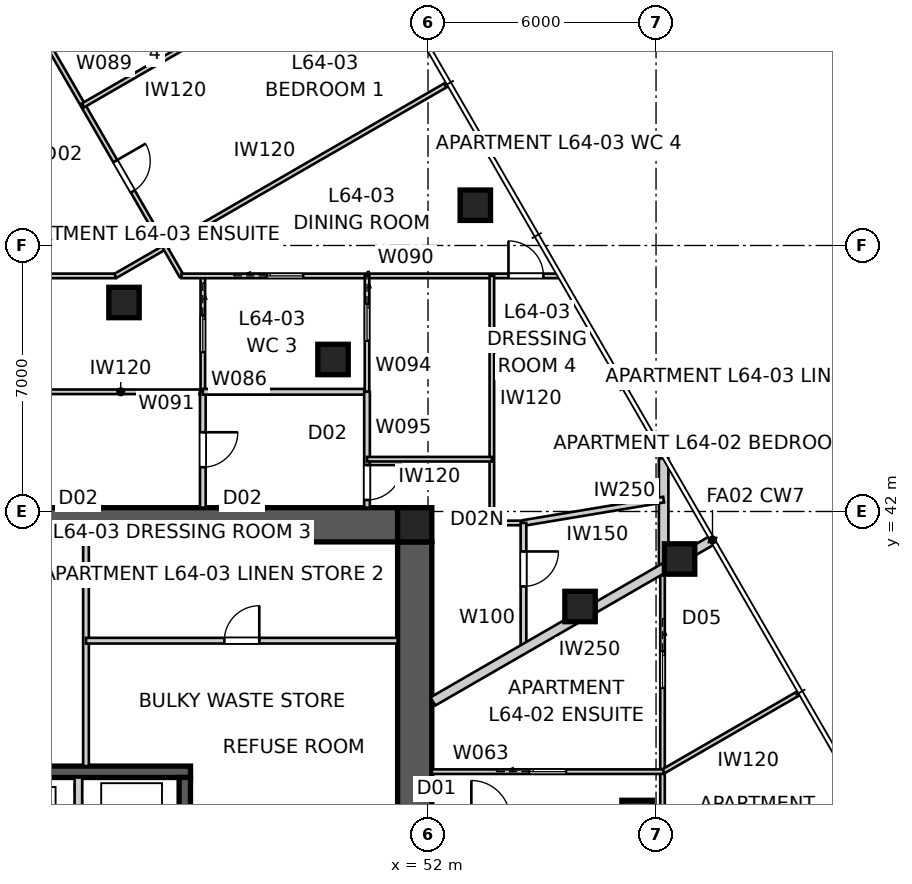
"""IFC4 building model, lengths in metres.
Left out: names, types, materials, properties, quantities, classifications, styles, units other than length and angle.
Written with IfcOpenShell. Run it as: python <this file> out.ifc"""

import sys

from ifc_helpers import new_model, si_unit, direction, frame, frame_2d, origin, origin_2d, place, context, subcontext, project, spatial, polyline, rectangle, outline, extrude, element, fill, save


model = new_model("IFC4")
c1 = context("Model", 3, precision=1e-05, world=origin(), true_north=direction((0.0, 1.0)))
c2 = subcontext(c1, "Body", "Model", "MODEL_VIEW")
j1 = project(units=[si_unit("LENGTHUNIT", "METRE"), si_unit("PLANEANGLEUNIT", "RADIAN")], contexts=[c1])
p1 = place(None, origin())
s1 = spatial("IfcSite", under=j1, at=p1, CompositionType="ELEMENT")
p2 = place(p1, origin())
s2 = spatial("IfcBuilding", under=s1, at=p2, CompositionType="ELEMENT")
p3 = place(p2, frame((0.0, 0.0, 232.0)))
s3 = spatial("IfcBuildingStorey", under=s2, at=p3, CompositionType="ELEMENT", Elevation=232.0)
p4 = place(p3, frame((28.8, 41.65, 0.0), z_axis=(0.0, 0.0, 1.0), x_axis=(1.0, 0.0, 0.0)))
e1 = element("IfcWall", 1, at=p4, inside=s3, PredefinedType="SHEAR", context=c2, shape_type="SweptSolid", body=[
    extrude(outline(polyline([(0.0, -0.45), (22.4, -0.45), (22.4, -0.025), (22.85, -0.025), (22.85, 0.025), (22.4, 0.025), (22.4, 0.45), (0.0, 0.45), (0.0, 0.025), (-0.45, 0.025), (-0.45, -0.025), (0.0, -0.025), (0.0, -0.45)])), origin(), (0.0, 0.0, 1.0), 3.4),
])
p5 = place(p3, frame((51.65, 18.8, 0.0), z_axis=(0.0, 0.0, 1.0), x_axis=(0.0, 1.0, 0.0)))
e2 = element("IfcWall", 2, at=p5, inside=s3, PredefinedType="SHEAR", context=c2, shape_type="SweptSolid", body=[
    extrude(outline(polyline([(0.0, -0.45), (22.4, -0.45), (22.4, -0.025), (22.85, -0.025), (22.85, 0.025), (22.4, 0.025), (22.4, 0.45), (0.0, 0.45), (0.0, 0.025), (-0.45, 0.025), (-0.45, -0.025), (0.0, -0.025), (0.0, -0.45)])), origin(), (0.0, 0.0, 1.0), 3.4),
])
p6 = place(p5, frame((11.14, 0.0, 0.0)))
e3 = element("IfcOpeningElement", 3, at=p6, cuts=e2, PredefinedType="OPENING", context=c2, shape_type="SweptSolid", body=[
    extrude(rectangle(XDim=1.02, YDim=2.4, at=frame_2d((0.51, 1.2))), frame((0.0, 0.46, 0.0), z_axis=(0.0, -1.0, 0.0), x_axis=(1.0, 0.0, 0.0)), (0.0, 0.0, 1.0), 0.92),
])
p7 = place(p3, frame((34.25, 35.15, 0.0), z_axis=(0.0, 0.0, 1.0), x_axis=(1.0, 0.0, 0.0)))
e4 = element("IfcWall", 4, at=p7, inside=s3, PredefinedType="SHEAR", context=c2, shape_type="SweptSolid", body=[
    extrude(rectangle(XDim=11.5, YDim=0.3, at=frame_2d((5.75, 0.0))), origin(), (0.0, 0.0, 1.0), 3.4),
])
p8 = place(p3, frame((42.8, 32.2, 0.0), z_axis=(0.0, 0.0, 1.0), x_axis=(0.0, 1.0, 0.0)))
e5 = element("IfcWall", 5, at=p8, inside=s3, PredefinedType="SOLIDWALL", context=c2, shape_type="SweptSolid", body=[
    extrude(rectangle(XDim=2.8, YDim=0.2, at=frame_2d((1.4, 0.0))), origin(), (0.0, 0.0, 1.0), 3.4),
])
p9 = place(p3, frame((45.6, 32.2, 0.0), z_axis=(0.0, 0.0, 1.0), x_axis=(0.0, 1.0, 0.0)))
e6 = element("IfcWall", 6, at=p9, inside=s3, PredefinedType="SHEAR", context=c2, shape_type="SweptSolid", body=[
    extrude(rectangle(XDim=2.8, YDim=0.3, at=frame_2d((1.4, 0.0))), origin(), (0.0, 0.0, 1.0), 3.4),
])
p10 = place(p3, frame((51.65, 41.65, 0.0), z_axis=(0.0, 0.0, 1.0), x_axis=(1.0, 0.0, 0.0)))
e7 = element("IfcColumn", 7, at=p10, inside=s3, PredefinedType="COLUMN", context=c2, shape_type="SweptSolid", body=[
    extrude(rectangle(XDim=0.9, YDim=0.9, at=origin_2d()), origin(), (0.0, 0.0, 1.0), 3.4),
])
for number, where, z_axis, x_axis in (
    (8, (58.62, 40.75, 0.0), (0.0, 0.0, 1.0), (1.0, 0.0, 0.0)),
    (9, (53.245, 50.06, 0.0), (0.0, 0.0, 1.0), (1.0, 0.0, 0.0)),
):
    element("IfcColumn", number, at=place(p3, frame(where, z_axis=z_axis, x_axis=x_axis)), inside=s3, PredefinedType="COLUMN", context=c2, shape_type="SweptSolid", body=[
        extrude(rectangle(XDim=0.8, YDim=0.8, at=origin_2d()), origin(), (0.0, 0.0, 1.0), 3.2),
    ])
for number, where, z_axis, x_axis in (
    (10, (57.5, 34.0, 0.0), (0.0, 0.0, 1.0), (1.0, 0.0, 0.0)),
    (11, (56.0, 39.5, 0.0), (0.0, 0.0, 1.0), (1.0, 0.0, 0.0)),
    (12, (49.5, 46.0, 0.0), (0.0, 0.0, 1.0), (1.0, 0.0, 0.0)),
    (13, (44.0, 47.5, 0.0), (0.0, 0.0, 1.0), (1.0, 0.0, 0.0)),
):
    element("IfcColumn", number, at=place(p3, frame(where, z_axis=z_axis, x_axis=x_axis)), inside=s3, PredefinedType="COLUMN", context=c2, shape_type="SweptSolid", body=[
        extrude(rectangle(XDim=0.8, YDim=0.8, at=origin_2d()), origin(), (0.0, 0.0, 1.0), 3.4),
    ])
p11 = place(p3, frame((59.486, 41.25, 0.0), z_axis=(0.0, 0.0, 1.0), x_axis=(-0.866020489494, -0.500008511703, 0.0)))
e14 = element("IfcWall", 14, at=p11, inside=s3, PredefinedType="PARTITIONING", context=c2, shape_type="SweptSolid", body=[
    extrude(rectangle(XDim=8.496, YDim=0.25, at=frame_2d((4.248, 0.0))), origin(), (0.0, 0.0, 1.0), 3.2),
])
p12 = place(p3, frame((43.0, 41.2, 0.0), z_axis=(0.0, 0.0, 1.0), x_axis=(0.0, -1.0, 0.0)))
e15 = element("IfcWall", 15, at=p12, inside=s3, PredefinedType="SOLIDWALL", context=c2, shape_type="SweptSolid", body=[
    extrude(rectangle(XDim=5.9, YDim=0.15, at=frame_2d((2.95, 0.0))), origin(), (0.0, 0.0, 1.0), 3.2),
])
p13 = place(p3, frame((43.0, 38.6, 0.0), z_axis=(0.0, 0.0, 1.0), x_axis=(1.0, 0.0, 0.0)))
e16 = element("IfcWall", 16, at=p13, inside=s3, PredefinedType="SOLIDWALL", context=c2, shape_type="SweptSolid", body=[
    extrude(rectangle(XDim=8.2, YDim=0.15, at=frame_2d((4.1, 0.0))), origin(), (0.0, 0.0, 1.0), 3.2),
])
p14 = place(p13, frame((3.64, 0.0, 0.0)))
e17 = element("IfcOpeningElement", 17, at=p14, cuts=e16, PredefinedType="OPENING", context=c2, shape_type="SweptSolid", body=[
    extrude(rectangle(XDim=0.92, YDim=2.1, at=frame_2d((0.46, 1.05))), frame((0.0, 0.085, 0.0), z_axis=(0.0, -1.0, 0.0), x_axis=(1.0, 0.0, 0.0)), (0.0, 0.0, 1.0), 0.17),
])
p15 = place(p3, frame((58.171, 40.491, 0.0), z_axis=(0.0, 0.0, 1.0), x_axis=(-5.1455328e-05, -0.999999998676, 0.0)))
e18 = element("IfcWall", 18, at=p15, inside=s3, PredefinedType="PARTITIONING", context=c2, shape_type="SweptSolid", body=[
    extrude(rectangle(XDim=14.234, YDim=0.12, at=frame_2d((7.117, 0.0))), origin(), (0.0, 0.0, 1.0), 3.2),
])
p16 = place(p15, frame((6.932, 0.0, 0.0)))
e19 = element("IfcOpeningElement", 19, at=p16, cuts=e18, PredefinedType="OPENING", context=c2, shape_type="SweptSolid", body=[
    extrude(rectangle(XDim=0.92, YDim=2.34, at=frame_2d((0.46, 1.17))), frame((0.0, 0.07, 0.0), z_axis=(0.0, -1.0, 0.0), x_axis=(1.0, 0.0, 0.0)), (0.0, 0.0, 1.0), 0.14),
])
p17 = place(p15, frame((11.829, 0.0, 0.0)))
e20 = element("IfcOpeningElement", 20, at=p17, cuts=e18, PredefinedType="OPENING", context=c2, shape_type="SweptSolid", body=[
    extrude(rectangle(XDim=0.96, YDim=2.1, at=frame_2d((0.48, 1.05))), frame((0.0, 0.07, 0.0), z_axis=(0.0, -1.0, 0.0), x_axis=(1.0, 0.0, 0.0)), (0.0, 0.0, 1.0), 0.14),
])
p18 = place(p15, frame((2.174, 0.0, 0.0)))
e21 = element("IfcOpeningElement", 21, at=p18, cuts=e18, PredefinedType="OPENING", context=c2, shape_type="SweptSolid", body=[
    extrude(rectangle(XDim=0.96, YDim=2.1, at=frame_2d((0.48, 1.05))), frame((0.0, 0.07, 0.0), z_axis=(0.0, -1.0, 0.0), x_axis=(1.0, 0.0, 0.0)), (0.0, 0.0, 1.0), 0.14),
])
p19 = place(p3, frame((52.1, 35.153, 0.0), z_axis=(0.0, 0.0, 1.0), x_axis=(1.0, 0.0, 0.0)))
e22 = element("IfcWall", 22, at=p19, inside=s3, PredefinedType="PARTITIONING", context=c2, shape_type="SweptSolid", body=[
    extrude(rectangle(XDim=6.1, YDim=0.12, at=frame_2d((3.05, 0.0))), origin(), (0.0, 0.0, 1.0), 3.2),
])
p20 = place(p19, frame((2.57, 0.0, 0.0)))
e23 = element("IfcOpeningElement", 23, at=p20, cuts=e22, PredefinedType="OPENING", context=c2, shape_type="SweptSolid", body=[
    extrude(rectangle(XDim=0.96, YDim=2.1, at=frame_2d((0.48, 1.05))), frame((0.0, 0.07, 0.0), z_axis=(0.0, -1.0, 0.0), x_axis=(1.0, 0.0, 0.0)), (0.0, 0.0, 1.0), 0.14),
])
p21 = place(p3, frame((58.2, 35.167, 0.0), z_axis=(0.0, 0.0, 1.0), x_axis=(0.866025520146, 0.499999798456, 0.0)))
e24 = element("IfcWall", 24, at=p21, inside=s3, PredefinedType="PARTITIONING", context=c2, shape_type="SweptSolid", body=[
    extrude(rectangle(XDim=4.115, YDim=0.12, at=frame_2d((2.057, 0.0))), origin(), (0.0, 0.0, 1.0), 3.2),
])
p22 = place(p3, frame((58.2, 40.525, 0.0), z_axis=(0.0, 0.0, 1.0), x_axis=(0.0, 1.0, 0.0)))
e25 = element("IfcWall", 25, at=p22, inside=s3, PredefinedType="PARTITIONING", context=c2, shape_type="SweptSolid", body=[
    extrude(rectangle(XDim=2.872, YDim=0.25, at=frame_2d((1.436, 0.0))), origin(), (0.0, 0.0, 1.0), 3.2),
])
p23 = place(p3, frame((26.603, 48.2, 0.0), z_axis=(0.0, 0.0, 1.0), x_axis=(1.0, 0.0, 0.0)))
e26 = element("IfcWall", 26, at=p23, inside=s3, PredefinedType="PARTITIONING", context=c2, shape_type="SweptSolid", body=[
    extrude(rectangle(XDim=17.17, YDim=0.12, at=frame_2d((8.585, 0.0))), origin(), (0.0, 0.0, 1.0), 3.2),
])
p24 = place(p23, frame((1.25, 0.0, 0.0)))
e27 = element("IfcOpeningElement", 27, at=p24, cuts=e26, PredefinedType="OPENING", context=c2, shape_type="SweptSolid", body=[
    extrude(rectangle(XDim=0.92, YDim=2.1, at=frame_2d((0.46, 1.05))), frame((0.0, 0.07, 0.0), z_axis=(0.0, -1.0, 0.0), x_axis=(1.0, 0.0, 0.0)), (0.0, 0.0, 1.0), 0.14),
])
p25 = place(p3, frame((46.074, 45.15, 0.0), z_axis=(0.0, 0.0, 1.0), x_axis=(-1.0, 0.0, 0.0)))
e28 = element("IfcWall", 28, at=p25, inside=s3, PredefinedType="PARTITIONING", context=c2, shape_type="SweptSolid", body=[
    extrude(rectangle(XDim=4.321, YDim=0.12, at=frame_2d((2.16, 0.0))), origin(), (0.0, 0.0, 1.0), 3.2),
])
p26 = place(p3, frame((46.074, 48.2, 0.0), z_axis=(0.0, 0.0, 1.0), x_axis=(0.0, -1.0, 0.0)))
e29 = element("IfcWall", 29, at=p26, inside=s3, PredefinedType="PARTITIONING", context=c2, shape_type="SweptSolid", body=[
    extrude(rectangle(XDim=3.05, YDim=0.12, at=frame_2d((1.525, 0.0))), origin(), (0.0, 0.0, 1.0), 3.2),
])
p27 = place(p26, frame((1.045, 0.0, 0.0)))
e30 = element("IfcOpeningElement", 30, at=p27, cuts=e29, PredefinedType="OPENING", context=c2, shape_type="SweptSolid", body=[
    extrude(rectangle(XDim=0.96, YDim=2.1, at=frame_2d((0.48, 1.05))), frame((0.0, 0.07, 0.0), z_axis=(0.0, -1.0, 0.0), x_axis=(1.0, 0.0, 0.0)), (0.0, 0.0, 1.0), 0.14),
])
p28 = place(p3, frame((43.773, 48.2, 0.0), z_axis=(0.0, 0.0, 1.0), x_axis=(0.866020818659, 0.500007941587, 0.0)))
e31 = element("IfcWall", 31, at=p28, inside=s3, PredefinedType="PARTITIONING", context=c2, shape_type="SweptSolid", body=[
    extrude(rectangle(XDim=10.092, YDim=0.12, at=frame_2d((5.046, 0.0))), origin(), (0.0, 0.0, 1.0), 3.2),
])
p29 = place(p3, frame((40.786, 56.388, 0.0), z_axis=(0.0, 0.0, 1.0), x_axis=(0.49999364752, -0.86602907136, 0.0)))
e32 = element("IfcWall", 32, at=p29, inside=s3, PredefinedType="PARTITIONING", context=c2, shape_type="SweptSolid", body=[
    extrude(rectangle(XDim=9.455, YDim=0.12, at=frame_2d((4.728, 0.0))), origin(), (0.0, 0.0, 1.0), 3.2),
])
p30 = place(p29, frame((1.681, 0.0, 0.0)))
e33 = element("IfcOpeningElement", 33, at=p30, cuts=e32, PredefinedType="OPENING", context=c2, shape_type="SweptSolid", body=[
    extrude(rectangle(XDim=0.92, YDim=2.34, at=frame_2d((0.46, 1.17))), frame((0.0, 0.07, 0.0), z_axis=(0.0, -1.0, 0.0), x_axis=(1.0, 0.0, 0.0)), (0.0, 0.0, 1.0), 0.14),
])
p31 = place(p29, frame((5.969, 0.0, 0.0)))
e34 = element("IfcOpeningElement", 34, at=p31, cuts=e32, PredefinedType="OPENING", context=c2, shape_type="SweptSolid", body=[
    extrude(rectangle(XDim=0.92, YDim=2.34, at=frame_2d((0.46, 1.17))), frame((0.0, 0.07, 0.0), z_axis=(0.0, -1.0, 0.0), x_axis=(1.0, 0.0, 0.0)), (0.0, 0.0, 1.0), 0.14),
])
p32 = place(p3, frame((45.514, 48.2, 0.0), z_axis=(0.0, 0.0, 1.0), x_axis=(1.0, 0.0, 0.0)))
e35 = element("IfcWall", 35, at=p32, inside=s3, PredefinedType="PARTITIONING", context=c2, shape_type="SweptSolid", body=[
    extrude(rectangle(XDim=9.913, YDim=0.12, at=frame_2d((4.957, 0.0))), origin(), (0.0, 0.0, 1.0), 3.2),
])
p33 = place(p32, frame((2.241, 0.0, 0.0)))
e36 = element("IfcOpeningElement", 36, at=p33, cuts=e35, PredefinedType="OPENING", context=c2, shape_type="SweptSolid", body=[
    extrude(rectangle(XDim=0.96, YDim=2.1, at=frame_2d((0.48, 1.05))), frame((0.0, 0.07, 0.0), z_axis=(0.0, -1.0, 0.0), x_axis=(1.0, 0.0, 0.0)), (0.0, 0.0, 1.0), 0.14),
])
p34 = place(p32, frame((8.603, 0.0, 0.0)))
e37 = element("IfcOpeningElement", 37, at=p34, cuts=e35, PredefinedType="OPENING", context=c2, shape_type="SweptSolid", body=[
    extrude(rectangle(XDim=0.92, YDim=2.1, at=frame_2d((0.46, 1.05))), frame((0.0, 0.07, 0.0), z_axis=(0.0, -1.0, 0.0), x_axis=(1.0, 0.0, 0.0)), (0.0, 0.0, 1.0), 0.14),
])
p35 = place(p3, frame((46.074, 45.15, 0.0), z_axis=(0.0, 0.0, 1.0), x_axis=(0.0, -1.0, 0.0)))
e38 = element("IfcWall", 38, at=p35, inside=s3, PredefinedType="SOLIDWALL", context=c2, shape_type="SweptSolid", body=[
    extrude(rectangle(XDim=3.05, YDim=0.15, at=frame_2d((1.525, 0.0))), origin(), (0.0, 0.0, 1.0), 3.2),
])
p36 = place(p35, frame((1.065, 0.0, 0.0)))
e39 = element("IfcOpeningElement", 39, at=p36, cuts=e38, PredefinedType="OPENING", context=c2, shape_type="SweptSolid", body=[
    extrude(rectangle(XDim=0.92, YDim=2.34, at=frame_2d((0.46, 1.17))), frame((0.0, 0.085, 0.0), z_axis=(0.0, -1.0, 0.0), x_axis=(1.0, 0.0, 0.0)), (0.0, 0.0, 1.0), 0.17),
])
p37 = place(p3, frame((50.395, 45.15, 0.0), z_axis=(0.0, 0.0, 1.0), x_axis=(-1.0, 0.0, 0.0)))
e40 = element("IfcWall", 40, at=p37, inside=s3, PredefinedType="SOLIDWALL", context=c2, shape_type="SweptSolid", body=[
    extrude(rectangle(XDim=4.321, YDim=0.15, at=frame_2d((2.16, 0.0))), origin(), (0.0, 0.0, 1.0), 3.2),
])
p38 = place(p3, frame((50.395, 48.2, 0.0), z_axis=(0.0, 0.0, 1.0), x_axis=(0.0, -1.0, 0.0)))
e41 = element("IfcWall", 41, at=p38, inside=s3, PredefinedType="PARTITIONING", context=c2, shape_type="SweptSolid", body=[
    extrude(rectangle(XDim=3.05, YDim=0.12, at=frame_2d((1.525, 0.0))), origin(), (0.0, 0.0, 1.0), 3.2),
])
p39 = place(p38, frame((0.745, 0.0, 0.0)))
e42 = element("IfcOpeningElement", 42, at=p39, cuts=e41, PredefinedType="OPENING", context=c2, shape_type="SweptSolid", body=[
    extrude(rectangle(XDim=0.96, YDim=2.1, at=frame_2d((0.48, 1.05))), frame((0.0, 0.07, 0.0), z_axis=(0.0, -1.0, 0.0), x_axis=(1.0, 0.0, 0.0)), (0.0, 0.0, 1.0), 0.14),
])
p40 = place(p3, frame((50.395, 45.15, 0.0), z_axis=(0.0, 0.0, 1.0), x_axis=(0.0, -1.0, 0.0)))
e43 = element("IfcWall", 43, at=p40, inside=s3, PredefinedType="SOLIDWALL", context=c2, shape_type="SweptSolid", body=[
    extrude(rectangle(XDim=3.05, YDim=0.15, at=frame_2d((1.525, 0.0))), origin(), (0.0, 0.0, 1.0), 3.2),
])
p41 = place(p40, frame((1.927, 0.0, 0.0)))
e44 = element("IfcOpeningElement", 44, at=p41, cuts=e43, PredefinedType="OPENING", context=c2, shape_type="SweptSolid", body=[
    extrude(rectangle(XDim=0.92, YDim=2.34, at=frame_2d((0.46, 1.17))), frame((0.0, 0.085, 0.0), z_axis=(0.0, -1.0, 0.0), x_axis=(1.0, 0.0, 0.0)), (0.0, 0.0, 1.0), 0.17),
])
p42 = place(p3, frame((53.68, 41.698, 0.0), z_axis=(0.0, 0.0, 1.0), x_axis=(0.0, 1.0, 0.0)))
e45 = element("IfcWall", 45, at=p42, inside=s3, PredefinedType="PARTITIONING", context=c2, shape_type="SweptSolid", body=[
    extrude(rectangle(XDim=6.501, YDim=0.12, at=frame_2d((3.251, 0.0))), origin(), (0.0, 0.0, 1.0), 3.2),
])
p43 = place(p3, frame((54.512, 41.698, 0.0), z_axis=(0.0, 0.0, 1.0), x_axis=(-1.0, 0.0, 0.0)))
e46 = element("IfcWall", 46, at=p43, inside=s3, PredefinedType="PARTITIONING", context=c2, shape_type="SweptSolid", body=[
    extrude(rectangle(XDim=0.832, YDim=0.12, at=frame_2d((0.416, 0.0))), origin(), (0.0, 0.0, 1.0), 3.2),
])
p44 = place(p3, frame((58.2, 42.312, 0.0), z_axis=(0.0, 0.0, 1.0), x_axis=(-0.986423908189, -0.164218979883, 0.0)))
e47 = element("IfcWall", 47, at=p44, inside=s3, PredefinedType="SOLIDWALL", context=c2, shape_type="SweptSolid", body=[
    extrude(rectangle(XDim=3.739, YDim=0.15, at=frame_2d((1.87, 0.0))), origin(), (0.0, 0.0, 1.0), 3.2),
])
p45 = place(p3, frame((53.68, 43.376, 0.0), z_axis=(0.0, 0.0, 1.0), x_axis=(-1.0, 0.0, 0.0)))
e48 = element("IfcWall", 48, at=p45, inside=s3, PredefinedType="PARTITIONING", context=c2, shape_type="SweptSolid", body=[
    extrude(rectangle(XDim=3.285, YDim=0.12, at=frame_2d((1.643, 0.0))), origin(), (0.0, 0.0, 1.0), 3.2),
])
p46 = place(p3, frame((54.512, 41.698, 0.0), z_axis=(0.0, 0.0, 1.0), x_axis=(0.0, -1.0, 0.0)))
e49 = element("IfcWall", 49, at=p46, inside=s3, PredefinedType="SOLIDWALL", context=c2, shape_type="SweptSolid", body=[
    extrude(rectangle(XDim=3.32, YDim=0.15, at=frame_2d((1.66, 0.0))), origin(), (0.0, 0.0, 1.0), 3.2),
])
p47 = place(p46, frame((0.75, 0.0, 0.0)))
e50 = element("IfcOpeningElement", 50, at=p47, cuts=e49, PredefinedType="OPENING", context=c2, shape_type="SweptSolid", body=[
    extrude(rectangle(XDim=0.92, YDim=2.0, at=frame_2d((0.46, 1.0))), frame((0.0, 0.085, 0.0), z_axis=(0.0, -1.0, 0.0), x_axis=(1.0, 0.0, 0.0)), (0.0, 0.0, 1.0), 0.17),
])
p48 = place(p3, frame((42.922, 52.688, 0.0), z_axis=(0.0, 0.0, 1.0), x_axis=(0.866034300541, 0.499984590049, 0.0)))
e51 = element("IfcWall", 51, at=p48, inside=s3, PredefinedType="PARTITIONING", context=c2, shape_type="SweptSolid", body=[
    extrude(rectangle(XDim=4.595, YDim=0.12, at=frame_2d((2.298, 0.0))), origin(), (0.0, 0.0, 1.0), 3.2),
])
p49 = place(p14, origin())
e52 = element("IfcDoor", 52, at=p49, inside=s3, OperationType="SINGLE_SWING_RIGHT", PredefinedType="DOOR", context=c2, shape_type="SweptSolid", body=[
    extrude(rectangle(XDim=0.92, YDim=2.1, at=frame_2d((0.46, 1.05))), frame((0.0, 0.025, 0.0), z_axis=(0.0, -1.0, 0.0), x_axis=(1.0, 0.0, 0.0)), (0.0, 0.0, 1.0), 0.05),
])
fill(e17, e52)
p50 = place(p20, origin())
e53 = element("IfcDoor", 53, at=p50, inside=s3, OperationType="SLIDING_TO_LEFT", PredefinedType="DOOR", context=c2, shape_type="SweptSolid", body=[
    extrude(rectangle(XDim=0.96, YDim=2.1, at=frame_2d((0.48, 1.05))), frame((0.0, 0.025, 0.0), z_axis=(0.0, -1.0, 0.0), x_axis=(1.0, 0.0, 0.0)), (0.0, 0.0, 1.0), 0.05),
])
fill(e23, e53)
p51 = place(p18, origin())
e54 = element("IfcDoor", 54, at=p51, inside=s3, OperationType="SLIDING_TO_LEFT", PredefinedType="DOOR", context=c2, shape_type="SweptSolid", body=[
    extrude(rectangle(XDim=0.96, YDim=2.1, at=frame_2d((0.48, 1.05))), frame((0.0, 0.025, 0.0), z_axis=(0.0, -1.0, 0.0), x_axis=(1.0, 0.0, 0.0)), (0.0, 0.0, 1.0), 0.05),
])
fill(e21, e54)
p52 = place(p31, origin())
e55 = element("IfcDoor", 55, at=p52, inside=s3, OperationType="SINGLE_SWING_LEFT", PredefinedType="DOOR", context=c2, shape_type="SweptSolid", body=[
    extrude(rectangle(XDim=0.92, YDim=2.34, at=frame_2d((0.46, 1.17))), frame((0.0, 0.025, 0.0), z_axis=(0.0, -1.0, 0.0), x_axis=(1.0, 0.0, 0.0)), (0.0, 0.0, 1.0), 0.05),
])
fill(e34, e55)
p53 = place(p27, origin())
e56 = element("IfcDoor", 56, at=p53, inside=s3, OperationType="SLIDING_TO_LEFT", PredefinedType="DOOR", context=c2, shape_type="SweptSolid", body=[
    extrude(rectangle(XDim=0.96, YDim=2.1, at=frame_2d((0.48, 1.05))), frame((0.0, 0.025, 0.0), z_axis=(0.0, -1.0, 0.0), x_axis=(1.0, 0.0, 0.0)), (0.0, 0.0, 1.0), 0.05),
])
fill(e30, e56)
p54 = place(p36, origin())
e57 = element("IfcDoor", 57, at=p54, inside=s3, OperationType="SINGLE_SWING_LEFT", PredefinedType="DOOR", context=c2, shape_type="SweptSolid", body=[
    extrude(rectangle(XDim=0.92, YDim=2.34, at=frame_2d((0.46, 1.17))), frame((0.0, 0.025, 0.0), z_axis=(0.0, -1.0, 0.0), x_axis=(1.0, 0.0, 0.0)), (0.0, 0.0, 1.0), 0.05),
])
fill(e39, e57)
p55 = place(p33, origin())
e58 = element("IfcDoor", 58, at=p55, inside=s3, OperationType="SLIDING_TO_LEFT", PredefinedType="DOOR", context=c2, shape_type="SweptSolid", body=[
    extrude(rectangle(XDim=0.96, YDim=2.1, at=frame_2d((0.48, 1.05))), frame((0.0, 0.025, 0.0), z_axis=(0.0, -1.0, 0.0), x_axis=(1.0, 0.0, 0.0)), (0.0, 0.0, 1.0), 0.05),
])
fill(e36, e58)
p56 = place(p39, origin())
e59 = element("IfcDoor", 59, at=p56, inside=s3, OperationType="SLIDING_TO_LEFT", PredefinedType="DOOR", context=c2, shape_type="SweptSolid", body=[
    extrude(rectangle(XDim=0.96, YDim=2.1, at=frame_2d((0.48, 1.05))), frame((0.0, 0.025, 0.0), z_axis=(0.0, -1.0, 0.0), x_axis=(1.0, 0.0, 0.0)), (0.0, 0.0, 1.0), 0.05),
])
fill(e42, e59)
p57 = place(p41, origin())
e60 = element("IfcDoor", 60, at=p57, inside=s3, OperationType="SINGLE_SWING_LEFT", PredefinedType="DOOR", context=c2, shape_type="SweptSolid", body=[
    extrude(rectangle(XDim=0.92, YDim=2.34, at=frame_2d((0.46, 1.17))), frame((0.0, 0.025, 0.0), z_axis=(0.0, -1.0, 0.0), x_axis=(1.0, 0.0, 0.0)), (0.0, 0.0, 1.0), 0.05),
])
fill(e44, e60)
p58 = place(p34, origin())
e61 = element("IfcDoor", 61, at=p58, inside=s3, OperationType="SINGLE_SWING_LEFT", PredefinedType="DOOR", context=c2, shape_type="SweptSolid", body=[
    extrude(rectangle(XDim=0.92, YDim=2.1, at=frame_2d((0.46, 1.05))), frame((0.0, 0.025, 0.0), z_axis=(0.0, -1.0, 0.0), x_axis=(1.0, 0.0, 0.0)), (0.0, 0.0, 1.0), 0.05),
])
fill(e37, e61)
p59 = place(p47, origin())
e62 = element("IfcDoor", 62, at=p59, inside=s3, OperationType="SINGLE_SWING_LEFT", PredefinedType="DOOR", context=c2, shape_type="SweptSolid", body=[
    extrude(rectangle(XDim=0.92, YDim=2.0, at=frame_2d((0.46, 1.0))), frame((0.0, 0.025, 0.0), z_axis=(0.0, -1.0, 0.0), x_axis=(1.0, 0.0, 0.0)), (0.0, 0.0, 1.0), 0.05),
])
fill(e50, e62)
save(model, sys.argv[1])
